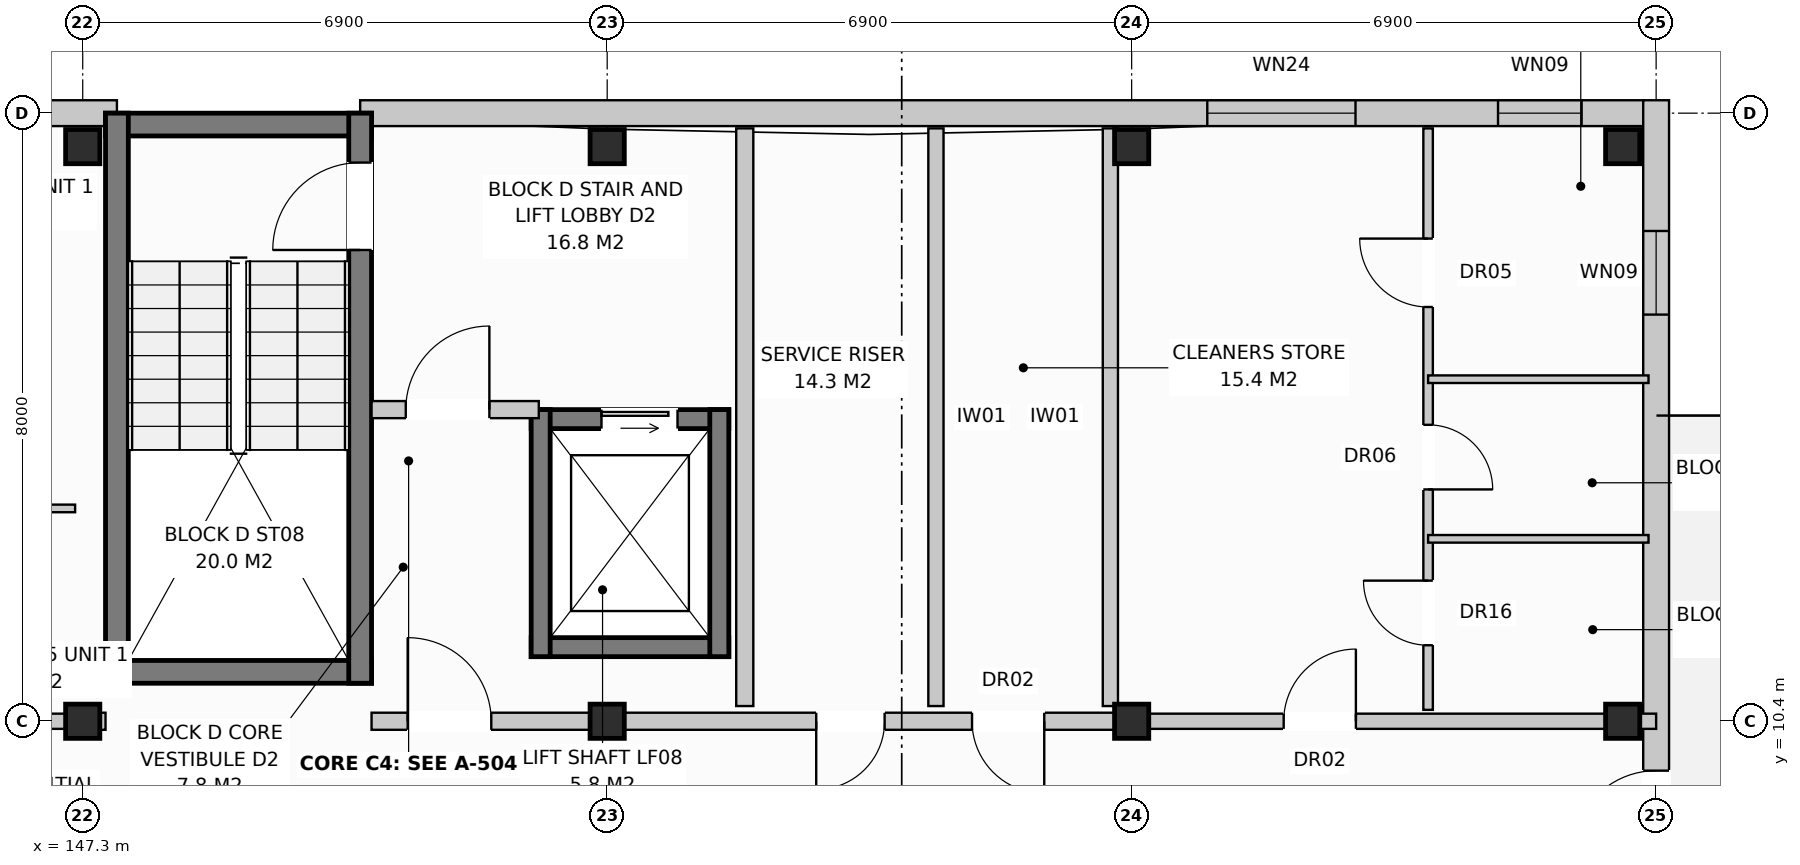
"""IFC4 building model, lengths in metres.
Left out: names, types, materials, properties, quantities, classifications, styles, units other than length and angle.
Written with IfcOpenShell. Run it as: python <this file> out.ifc"""

import sys

from ifc_helpers import new_model, si_unit, direction, frame, frame_2d, origin, origin_with_axes, origin_2d, place, context, subcontext, project, spatial, rectangle, extrude, element, fill, save


model = new_model("IFC4")
c1 = context("Model", 3, precision=1e-05, world=origin(), true_north=direction((0.0, 1.0)))
c2 = subcontext(c1, "Body", "Model", "MODEL_VIEW")
j1 = project(units=[si_unit("LENGTHUNIT", "METRE"), si_unit("PLANEANGLEUNIT", "RADIAN")], contexts=[c1])
p1 = place(None, origin())
s1 = spatial("IfcSite", under=j1, at=p1, CompositionType="ELEMENT")
p2 = place(p1, origin())
s2 = spatial("IfcBuilding", under=s1, at=p2, CompositionType="ELEMENT")
p3 = place(p2, frame((0.0, 0.0, 17.6)))
s3 = spatial("IfcBuildingStorey", under=s2, at=p3, CompositionType="ELEMENT", Elevation=17.6)
for number, where, z_axis, x_axis in (
    (1, (147.3, 10.4, 0.0), (0.0, 0.0, 1.0), (1.0, 0.0, 0.0)),
    (2, (147.3, 17.96, 0.0), (0.0, 0.0, 1.0), (1.0, 0.0, 0.0)),
    (3, (154.2, 10.4, 0.0), (0.0, 0.0, 1.0), (1.0, 0.0, 0.0)),
    (4, (154.2, 17.96, 0.0), (0.0, 0.0, 1.0), (1.0, 0.0, 0.0)),
    (5, (161.1, 10.4, 0.0), (0.0, 0.0, 1.0), (1.0, 0.0, 0.0)),
    (6, (161.1, 17.96, 0.0), (0.0, 0.0, 1.0), (1.0, 0.0, 0.0)),
    (7, (167.56, 10.4, 0.0), (0.0, 0.0, 1.0), (1.0, 0.0, 0.0)),
    (8, (167.56, 17.96, 0.0), (0.0, 0.0, 1.0), (1.0, 0.0, 0.0)),
):
    element("IfcColumn", number, at=place(p3, frame(where, z_axis=z_axis, x_axis=x_axis)), inside=s3, PredefinedType="COLUMN", context=c2, shape_type="SweptSolid", body=[
        extrude(rectangle(XDim=0.45, YDim=0.45, at=origin_2d()), origin(), (0.0, 0.0, 1.0), 3.2),
    ])
p4 = place(p3, frame((130.25, 18.4, 0.0), z_axis=(0.0, 0.0, 1.0), x_axis=(1.0, 0.0, 0.0)))
e9 = element("IfcWall", 9, at=p4, inside=s3, PredefinedType="STANDARD", context=c2, shape_type="SweptSolid", body=[
    extrude(rectangle(XDim=17.5, YDim=0.34, at=frame_2d((8.75, 0.0))), origin(), (0.0, 0.0, 1.0), 2.95),
])
p5 = place(p4, frame((11.92, 0.0, 0.0)))
e10 = element("IfcOpeningElement", 10, at=p5, cuts=e9, PredefinedType="OPENING", context=c2, shape_type="SweptSolid", body=[
    extrude(rectangle(XDim=1.05, YDim=2.12, at=frame_2d((0.525, 1.06))), frame((0.0, 0.182, 0.0), z_axis=(0.0, -1.0, 0.0), x_axis=(1.0, 0.0, 0.0)), (0.0, 0.0, 1.0), 0.364),
])
p6 = place(p4, frame((15.07, 0.0, 0.72)))
e11 = element("IfcOpeningElement", 11, at=p6, cuts=e9, PredefinedType="OPENING", context=c2, shape_type="SweptSolid", body=[
    extrude(rectangle(XDim=1.1, YDim=1.5, at=frame_2d((0.55, 0.75))), frame((0.0, 0.182, 0.0), z_axis=(0.0, -1.0, 0.0), x_axis=(1.0, 0.0, 0.0)), (0.0, 0.0, 1.0), 0.364),
])
p7 = place(p3, frame((150.95, 18.4, 0.0), z_axis=(0.0, 0.0, 1.0), x_axis=(1.0, 0.0, 0.0)))
e12 = element("IfcWall", 12, at=p7, inside=s3, PredefinedType="STANDARD", context=c2, shape_type="SweptSolid", body=[
    extrude(rectangle(XDim=16.89, YDim=0.34, at=frame_2d((8.445, 0.0))), origin(), (0.0, 0.0, 1.0), 2.95),
])
p8 = place(p7, frame((11.145, 0.0, 0.8)))
e13 = element("IfcOpeningElement", 13, at=p8, cuts=e12, PredefinedType="OPENING", context=c2, shape_type="SweptSolid", body=[
    extrude(rectangle(XDim=1.95, YDim=1.65, at=frame_2d((0.975, 0.825))), frame((0.0, 0.182, 0.0), z_axis=(0.0, -1.0, 0.0), x_axis=(1.0, 0.0, 0.0)), (0.0, 0.0, 1.0), 0.364),
])
p9 = place(p7, frame((14.97, 0.0, 0.72)))
e14 = element("IfcOpeningElement", 14, at=p9, cuts=e12, PredefinedType="OPENING", context=c2, shape_type="SweptSolid", body=[
    extrude(rectangle(XDim=1.1, YDim=1.5, at=frame_2d((0.55, 0.75))), frame((0.0, 0.182, 0.0), z_axis=(0.0, -1.0, 0.0), x_axis=(1.0, 0.0, 0.0)), (0.0, 0.0, 1.0), 0.364),
])
p10 = place(p3, frame((168.0, -0.17, 0.0), z_axis=(0.0, 0.0, 1.0), x_axis=(0.0, 1.0, 0.0)))
e15 = element("IfcWall", 15, at=p10, inside=s3, PredefinedType="STANDARD", context=c2, shape_type="SweptSolid", body=[
    extrude(rectangle(XDim=18.74, YDim=0.34, at=frame_2d((9.37, 0.0))), origin(), (0.0, 0.0, 1.0), 2.95),
])
p11 = place(p10, frame((8.82, 0.0, 0.0)))
e16 = element("IfcOpeningElement", 16, at=p11, cuts=e15, PredefinedType="OPENING", context=c2, shape_type="SweptSolid", body=[
    extrude(rectangle(XDim=1.1, YDim=2.1, at=frame_2d((0.55, 1.05))), frame((0.0, 0.182, 0.0), z_axis=(0.0, -1.0, 0.0), x_axis=(1.0, 0.0, 0.0)), (0.0, 0.0, 1.0), 0.364),
])
p12 = place(p10, frame((1.72, 0.0, 0.72)))
e17 = element("IfcOpeningElement", 17, at=p12, cuts=e15, PredefinedType="OPENING", context=c2, shape_type="SweptSolid", body=[
    extrude(rectangle(XDim=1.1, YDim=1.5, at=frame_2d((0.55, 0.75))), frame((0.0, 0.182, 0.0), z_axis=(0.0, -1.0, 0.0), x_axis=(1.0, 0.0, 0.0)), (0.0, 0.0, 1.0), 0.364),
])
p13 = place(p10, frame((15.92, 0.0, 0.72)))
e18 = element("IfcOpeningElement", 18, at=p13, cuts=e15, PredefinedType="OPENING", context=c2, shape_type="SweptSolid", body=[
    extrude(rectangle(XDim=1.1, YDim=1.5, at=frame_2d((0.55, 0.75))), frame((0.0, 0.182, 0.0), z_axis=(0.0, -1.0, 0.0), x_axis=(1.0, 0.0, 0.0)), (0.0, 0.0, 1.0), 0.364),
])
for number, where, z_axis, x_axis in (
    (19, (147.6, 18.25, 0.0), (0.0, 0.0, 1.0), (1.0, 0.0, 0.0)),
    (20, (147.6, 11.05, 0.0), (0.0, 0.0, 1.0), (1.0, 0.0, 0.0)),
):
    element("IfcWall", number, at=place(p3, frame(where, z_axis=z_axis, x_axis=x_axis)), inside=s3, PredefinedType="SHEAR", context=c2, shape_type="SweptSolid", body=[
        extrude(rectangle(XDim=3.5, YDim=0.3, at=frame_2d((1.75, 0.0))), origin(), (0.0, 0.0, 1.0), 2.95),
    ])
p14 = place(p3, frame((147.75, 10.9, 0.0), z_axis=(0.0, 0.0, 1.0), x_axis=(0.0, 1.0, 0.0)))
e21 = element("IfcWall", 21, at=p14, inside=s3, PredefinedType="SHEAR", context=c2, shape_type="SweptSolid", body=[
    extrude(rectangle(XDim=7.5, YDim=0.3, at=frame_2d((3.75, 0.0))), origin(), (0.0, 0.0, 1.0), 2.95),
])
p15 = place(p3, frame((150.95, 10.9, 0.0), z_axis=(0.0, 0.0, 1.0), x_axis=(0.0, 1.0, 0.0)))
e22 = element("IfcWall", 22, at=p15, inside=s3, PredefinedType="SHEAR", context=c2, shape_type="SweptSolid", body=[
    extrude(rectangle(XDim=7.5, YDim=0.3, at=frame_2d((3.75, 0.0))), origin(), (0.0, 0.0, 1.0), 2.95),
])
p16 = place(p15, frame((5.7, 0.0, 0.0)))
e23 = element("IfcOpeningElement", 23, at=p16, cuts=e22, PredefinedType="OPENING", context=c2, shape_type="SweptSolid", body=[
    extrude(rectangle(XDim=1.15, YDim=2.15, at=frame_2d((0.575, 1.075))), frame((0.0, 0.162, 0.0), z_axis=(0.0, -1.0, 0.0), x_axis=(1.0, 0.0, 0.0)), (0.0, 0.0, 1.0), 0.324),
])
p17 = place(p3, frame((153.2, 14.375, 0.0), z_axis=(0.0, 0.0, 1.0), x_axis=(1.0, 0.0, 0.0)))
e24 = element("IfcWall", 24, at=p17, inside=s3, PredefinedType="SHEAR", context=c2, shape_type="SweptSolid", body=[
    extrude(rectangle(XDim=2.6, YDim=0.25, at=frame_2d((1.3, 0.0))), origin(), (0.0, 0.0, 1.0), 2.95),
])
p18 = place(p17, frame((0.925, 0.0, 0.0)))
e25 = element("IfcOpeningElement", 25, at=p18, cuts=e24, PredefinedType="OPENING", context=c2, shape_type="SweptSolid", body=[
    extrude(rectangle(XDim=1.0, YDim=2.1, at=frame_2d((0.5, 1.05))), frame((0.0, 0.137, 0.0), z_axis=(0.0, -1.0, 0.0), x_axis=(1.0, 0.0, 0.0)), (0.0, 0.0, 1.0), 0.274),
])
p19 = place(p3, frame((153.2, 11.375, 0.0), z_axis=(0.0, 0.0, 1.0), x_axis=(1.0, 0.0, 0.0)))
e26 = element("IfcWall", 26, at=p19, inside=s3, PredefinedType="SHEAR", context=c2, shape_type="SweptSolid", body=[
    extrude(rectangle(XDim=2.6, YDim=0.25, at=frame_2d((1.3, 0.0))), origin(), (0.0, 0.0, 1.0), 2.95),
])
for number, where, z_axis, x_axis in (
    (27, (153.325, 11.25, 0.0), (0.0, 0.0, 1.0), (0.0, 1.0, 0.0)),
    (28, (155.675, 11.25, 0.0), (0.0, 0.0, 1.0), (0.0, 1.0, 0.0)),
):
    element("IfcWall", number, at=place(p3, frame(where, z_axis=z_axis, x_axis=x_axis)), inside=s3, PredefinedType="SHEAR", context=c2, shape_type="SweptSolid", body=[
        extrude(rectangle(XDim=3.25, YDim=0.25, at=frame_2d((1.625, 0.0))), origin(), (0.0, 0.0, 1.0), 2.95),
    ])
p20 = place(p3, frame((156.01, 10.6, 0.0), z_axis=(0.0, 0.0, 1.0), x_axis=(0.0, 1.0, 0.0)))
e29 = element("IfcWall", 29, at=p20, inside=s3, PredefinedType="PARTITIONING", context=c2, shape_type="SweptSolid", body=[
    extrude(rectangle(XDim=7.6, YDim=0.225, at=frame_2d((3.8, 0.0))), origin(), (0.0, 0.0, 1.0), 2.95),
])
p21 = place(p3, frame((151.1, 14.5, 0.0), z_axis=(0.0, 0.0, 1.0), x_axis=(1.0, 0.0, 0.0)))
e30 = element("IfcWall", 30, at=p21, inside=s3, PredefinedType="PARTITIONING", context=c2, shape_type="SweptSolid", body=[
    extrude(rectangle(XDim=2.2, YDim=0.225, at=frame_2d((1.1, 0.0))), origin(), (0.0, 0.0, 1.0), 2.95),
])
p22 = place(p21, frame((0.45, 0.0, 0.0)))
e31 = element("IfcOpeningElement", 31, at=p22, cuts=e30, PredefinedType="OPENING", context=c2, shape_type="SweptSolid", body=[
    extrude(rectangle(XDim=1.1, YDim=2.15, at=frame_2d((0.55, 1.075))), frame((0.0, 0.125, 0.0), z_axis=(0.0, -1.0, 0.0), x_axis=(1.0, 0.0, 0.0)), (0.0, 0.0, 1.0), 0.249),
])
p23 = place(p3, frame((147.3, 10.4, 0.0), z_axis=(0.0, 0.0, 1.0), x_axis=(1.0, 0.0, 0.0)))
e32 = element("IfcWall", 32, at=p23, inside=s3, PredefinedType="PARTITIONING", context=c2, shape_type="SweptSolid", body=[
    extrude(rectangle(XDim=0.3, YDim=0.225, at=frame_2d((0.15, 0.0))), origin(), (0.0, 0.0, 1.0), 2.95),
])
p24 = place(p3, frame((158.525, 10.6, 0.0), z_axis=(0.0, 0.0, 1.0), x_axis=(0.0, 1.0, 0.0)))
e33 = element("IfcWall", 33, at=p24, inside=s3, PredefinedType="PARTITIONING", context=c2, shape_type="SweptSolid", body=[
    extrude(rectangle(XDim=7.6, YDim=0.2, at=frame_2d((3.8, 0.0))), origin(), (0.0, 0.0, 1.0), 2.95),
])
p25 = place(p3, frame((160.82, 10.6, 0.0), z_axis=(0.0, 0.0, 1.0), x_axis=(0.0, 1.0, 0.0)))
e34 = element("IfcWall", 34, at=p25, inside=s3, PredefinedType="PARTITIONING", context=c2, shape_type="SweptSolid", body=[
    extrude(rectangle(XDim=7.6, YDim=0.2, at=frame_2d((3.8, 0.0))), origin(), (0.0, 0.0, 1.0), 2.39),
])
p26 = place(p3, frame((151.1, 10.4, 0.0), z_axis=(0.0, 0.0, 1.0), x_axis=(1.0, 0.0, 0.0)))
e35 = element("IfcWall", 35, at=p26, inside=s3, PredefinedType="PARTITIONING", context=c2, shape_type="SweptSolid", body=[
    extrude(rectangle(XDim=10.0, YDim=0.225, at=frame_2d((5.0, 0.0))), origin(), (0.0, 0.0, 1.0), 2.39),
])
p27 = place(p26, frame((0.475, 0.0, 0.0)))
e36 = element("IfcOpeningElement", 36, at=p27, cuts=e35, PredefinedType="OPENING", context=c2, shape_type="SweptSolid", body=[
    extrude(rectangle(XDim=1.1, YDim=2.15, at=frame_2d((0.55, 1.075))), frame((0.0, 0.125, 0.0), z_axis=(0.0, -1.0, 0.0), x_axis=(1.0, 0.0, 0.0)), (0.0, 0.0, 1.0), 0.249),
])
p28 = place(p26, frame((5.85, 0.0, 0.0)))
e37 = element("IfcOpeningElement", 37, at=p28, cuts=e35, PredefinedType="OPENING", context=c2, shape_type="SweptSolid", body=[
    extrude(rectangle(XDim=0.9, YDim=2.1, at=frame_2d((0.45, 1.05))), frame((0.0, 0.125, 0.0), z_axis=(0.0, -1.0, 0.0), x_axis=(1.0, 0.0, 0.0)), (0.0, 0.0, 1.0), 0.249),
])
p29 = place(p26, frame((7.9, 0.0, 0.0)))
e38 = element("IfcOpeningElement", 38, at=p29, cuts=e35, PredefinedType="OPENING", context=c2, shape_type="SweptSolid", body=[
    extrude(rectangle(XDim=0.95, YDim=2.15, at=frame_2d((0.475, 1.075))), frame((0.0, 0.125, 0.0), z_axis=(0.0, -1.0, 0.0), x_axis=(1.0, 0.0, 0.0)), (0.0, 0.0, 1.0), 0.249),
])
p30 = place(p3, frame((140.4, 10.4, 0.0), z_axis=(0.0, 0.0, 1.0), x_axis=(1.0, 0.0, 0.0)))
e39 = element("IfcWall", 39, at=p30, inside=s3, PredefinedType="PARTITIONING", context=c2, shape_type="SweptSolid", body=[
    extrude(rectangle(XDim=6.9, YDim=0.2, at=frame_2d((3.45, 0.0))), origin(), (0.0, 0.0, 1.0), 2.39),
])
p31 = place(p30, frame((2.0, 0.0, 0.0)))
e40 = element("IfcOpeningElement", 40, at=p31, cuts=e39, PredefinedType="OPENING", context=c2, shape_type="SweptSolid", body=[
    extrude(rectangle(XDim=0.95, YDim=2.15, at=frame_2d((0.475, 1.075))), frame((0.0, 0.112, 0.0), z_axis=(0.0, -1.0, 0.0), x_axis=(1.0, 0.0, 0.0)), (0.0, 0.0, 1.0), 0.224),
])
p32 = place(p3, frame((144.7, 13.2, 0.0), z_axis=(0.0, 0.0, 1.0), x_axis=(1.0, 0.0, 0.0)))
e41 = element("IfcWall", 41, at=p32, inside=s3, PredefinedType="PARTITIONING", context=c2, shape_type="SweptSolid", body=[
    extrude(rectangle(XDim=2.5, YDim=0.1, at=frame_2d((1.25, 0.0))), origin(), (0.0, 0.0, 1.0), 2.95),
])
p33 = place(p3, frame((161.1, 10.4, 0.0), z_axis=(0.0, 0.0, 1.0), x_axis=(1.0, 0.0, 0.0)))
e42 = element("IfcWall", 42, at=p33, inside=s3, PredefinedType="PARTITIONING", context=c2, shape_type="SweptSolid", body=[
    extrude(rectangle(XDim=6.9, YDim=0.2, at=frame_2d((3.45, 0.0))), origin(), (0.0, 0.0, 1.0), 2.39),
])
p34 = place(p33, frame((2.0, 0.0, 0.0)))
e43 = element("IfcOpeningElement", 43, at=p34, cuts=e42, PredefinedType="OPENING", context=c2, shape_type="SweptSolid", body=[
    extrude(rectangle(XDim=0.95, YDim=2.15, at=frame_2d((0.475, 1.075))), frame((0.0, 0.112, 0.0), z_axis=(0.0, -1.0, 0.0), x_axis=(1.0, 0.0, 0.0)), (0.0, 0.0, 1.0), 0.224),
])
p35 = place(p3, frame((165.0, 10.55, 0.0), z_axis=(0.0, 0.0, 1.0), x_axis=(0.0, 1.0, 0.0)))
e44 = element("IfcWall", 44, at=p35, inside=s3, PredefinedType="PARTITIONING", context=c2, shape_type="SweptSolid", body=[
    extrude(rectangle(XDim=7.65, YDim=0.125, at=frame_2d((3.825, 0.0))), origin(), (0.0, 0.0, 1.0), 2.95),
])
p36 = place(p35, frame((0.85, 0.0, 0.0)))
e45 = element("IfcOpeningElement", 45, at=p36, cuts=e44, PredefinedType="OPENING", context=c2, shape_type="SweptSolid", body=[
    extrude(rectangle(XDim=0.85, YDim=2.1, at=frame_2d((0.425, 1.05))), frame((0.0, 0.074, 0.0), z_axis=(0.0, -1.0, 0.0), x_axis=(1.0, 0.0, 0.0)), (0.0, 0.0, 1.0), 0.149),
])
p37 = place(p35, frame((2.9, 0.0, 0.0)))
e46 = element("IfcOpeningElement", 46, at=p37, cuts=e44, PredefinedType="OPENING", context=c2, shape_type="SweptSolid", body=[
    extrude(rectangle(XDim=0.85, YDim=2.05, at=frame_2d((0.425, 1.025))), frame((0.0, 0.074, 0.0), z_axis=(0.0, -1.0, 0.0), x_axis=(1.0, 0.0, 0.0)), (0.0, 0.0, 1.0), 0.149),
])
p38 = place(p35, frame((5.3, 0.0, 0.0)))
e47 = element("IfcOpeningElement", 47, at=p38, cuts=e44, PredefinedType="OPENING", context=c2, shape_type="SweptSolid", body=[
    extrude(rectangle(XDim=0.9, YDim=2.1, at=frame_2d((0.45, 1.05))), frame((0.0, 0.074, 0.0), z_axis=(0.0, -1.0, 0.0), x_axis=(1.0, 0.0, 0.0)), (0.0, 0.0, 1.0), 0.149),
])
for number, where, z_axis, x_axis in (
    (48, (165.0, 12.8, 0.0), (0.0, 0.0, 1.0), (1.0, 0.0, 0.0)),
    (49, (165.0, 14.9, 0.0), (0.0, 0.0, 1.0), (1.0, 0.0, 0.0)),
):
    element("IfcWall", number, at=place(p3, frame(where, z_axis=z_axis, x_axis=x_axis)), inside=s3, PredefinedType="PARTITIONING", context=c2, shape_type="SweptSolid", body=[
        extrude(rectangle(XDim=2.9, YDim=0.1, at=frame_2d((1.45, 0.0))), origin(), (0.0, 0.0, 1.0), 2.95),
    ])
p39 = place(p8, origin_with_axes())
e50 = element("IfcWindow", 50, at=p39, inside=s3, PartitioningType="SINGLE_PANEL", PredefinedType="WINDOW", context=c2, shape_type="SweptSolid", body=[
    extrude(rectangle(XDim=1.95, YDim=1.65, at=frame_2d((0.975, 0.825))), frame((0.0, 0.03, 0.0), z_axis=(0.0, -1.0, 0.0), x_axis=(1.0, 0.0, 0.0)), (0.0, 0.0, 1.0), 0.06),
])
fill(e13, e50)
p40 = place(p9, origin_with_axes())
e51 = element("IfcWindow", 51, at=p40, inside=s3, PartitioningType="SINGLE_PANEL", PredefinedType="WINDOW", context=c2, shape_type="SweptSolid", body=[
    extrude(rectangle(XDim=1.1, YDim=1.5, at=frame_2d((0.55, 0.75))), frame((0.0, 0.03, 0.0), z_axis=(0.0, -1.0, 0.0), x_axis=(1.0, 0.0, 0.0)), (0.0, 0.0, 1.0), 0.06),
])
fill(e14, e51)
p41 = place(p11, origin_with_axes())
e52 = element("IfcDoor", 52, at=p41, inside=s3, OperationType="SINGLE_SWING_LEFT", PredefinedType="DOOR", context=c2, shape_type="SweptSolid", body=[
    extrude(rectangle(XDim=1.1, YDim=2.1, at=frame_2d((0.55, 1.05))), frame((0.0, 0.025, 0.0), z_axis=(0.0, -1.0, 0.0), x_axis=(1.0, 0.0, 0.0)), (0.0, 0.0, 1.0), 0.05),
])
fill(e16, e52)
p42 = place(p13, origin_with_axes())
e53 = element("IfcWindow", 53, at=p42, inside=s3, PartitioningType="SINGLE_PANEL", PredefinedType="WINDOW", context=c2, shape_type="SweptSolid", body=[
    extrude(rectangle(XDim=1.1, YDim=1.5, at=frame_2d((0.55, 0.75))), frame((0.0, 0.03, 0.0), z_axis=(0.0, -1.0, 0.0), x_axis=(1.0, 0.0, 0.0)), (0.0, 0.0, 1.0), 0.06),
])
fill(e18, e53)
p43 = place(p16, origin_with_axes())
e54 = element("IfcDoor", 54, at=p43, inside=s3, OperationType="SINGLE_SWING_LEFT", PredefinedType="DOOR", context=c2, shape_type="SweptSolid", body=[
    extrude(rectangle(XDim=1.15, YDim=2.15, at=frame_2d((0.575, 1.075))), frame((0.0, 0.025, 0.0), z_axis=(0.0, -1.0, 0.0), x_axis=(1.0, 0.0, 0.0)), (0.0, 0.0, 1.0), 0.05),
])
fill(e23, e54)
p44 = place(p18, origin_with_axes())
e55 = element("IfcDoor", 55, at=p44, inside=s3, OperationType="SLIDING_TO_LEFT", PredefinedType="DOOR", context=c2, shape_type="SweptSolid", body=[
    extrude(rectangle(XDim=1.0, YDim=2.1, at=frame_2d((0.5, 1.05))), frame((0.0, 0.025, 0.0), z_axis=(0.0, -1.0, 0.0), x_axis=(1.0, 0.0, 0.0)), (0.0, 0.0, 1.0), 0.05),
])
fill(e25, e55)
p45 = place(p22, origin_with_axes())
e56 = element("IfcDoor", 56, at=p45, inside=s3, OperationType="SINGLE_SWING_RIGHT", PredefinedType="DOOR", context=c2, shape_type="SweptSolid", body=[
    extrude(rectangle(XDim=1.1, YDim=2.15, at=frame_2d((0.55, 1.075))), frame((0.0, 0.025, 0.0), z_axis=(0.0, -1.0, 0.0), x_axis=(1.0, 0.0, 0.0)), (0.0, 0.0, 1.0), 0.05),
])
fill(e31, e56)
p46 = place(p27, origin_with_axes())
e57 = element("IfcDoor", 57, at=p46, inside=s3, OperationType="SINGLE_SWING_LEFT", PredefinedType="DOOR", context=c2, shape_type="SweptSolid", body=[
    extrude(rectangle(XDim=1.1, YDim=2.15, at=frame_2d((0.55, 1.075))), frame((0.0, 0.025, 0.0), z_axis=(0.0, -1.0, 0.0), x_axis=(1.0, 0.0, 0.0)), (0.0, 0.0, 1.0), 0.05),
])
fill(e36, e57)
p47 = place(p28, frame((0.9, 0.0, 0.0), z_axis=(0.0, 0.0, 1.0), x_axis=(-1.0, 0.0, 0.0)))
e58 = element("IfcDoor", 58, at=p47, inside=s3, OperationType="SINGLE_SWING_LEFT", PredefinedType="DOOR", context=c2, shape_type="SweptSolid", body=[
    extrude(rectangle(XDim=0.9, YDim=2.1, at=frame_2d((0.45, 1.05))), frame((0.0, 0.025, 0.0), z_axis=(0.0, -1.0, 0.0), x_axis=(1.0, 0.0, 0.0)), (0.0, 0.0, 1.0), 0.05),
])
fill(e37, e58)
p48 = place(p29, frame((0.95, 0.0, 0.0), z_axis=(0.0, 0.0, 1.0), x_axis=(-1.0, 0.0, 0.0)))
e59 = element("IfcDoor", 59, at=p48, inside=s3, OperationType="SINGLE_SWING_RIGHT", PredefinedType="DOOR", context=c2, shape_type="SweptSolid", body=[
    extrude(rectangle(XDim=0.95, YDim=2.15, at=frame_2d((0.475, 1.075))), frame((0.0, 0.025, 0.0), z_axis=(0.0, -1.0, 0.0), x_axis=(1.0, 0.0, 0.0)), (0.0, 0.0, 1.0), 0.05),
])
fill(e38, e59)
p49 = place(p34, origin_with_axes())
e60 = element("IfcDoor", 60, at=p49, inside=s3, OperationType="SINGLE_SWING_RIGHT", PredefinedType="DOOR", context=c2, shape_type="SweptSolid", body=[
    extrude(rectangle(XDim=0.95, YDim=2.15, at=frame_2d((0.475, 1.075))), frame((0.0, 0.025, 0.0), z_axis=(0.0, -1.0, 0.0), x_axis=(1.0, 0.0, 0.0)), (0.0, 0.0, 1.0), 0.05),
])
fill(e43, e60)
p50 = place(p36, origin_with_axes())
e61 = element("IfcDoor", 61, at=p50, inside=s3, OperationType="SINGLE_SWING_RIGHT", PredefinedType="DOOR", context=c2, shape_type="SweptSolid", body=[
    extrude(rectangle(XDim=0.85, YDim=2.1, at=frame_2d((0.425, 1.05))), frame((0.0, 0.025, 0.0), z_axis=(0.0, -1.0, 0.0), x_axis=(1.0, 0.0, 0.0)), (0.0, 0.0, 1.0), 0.05),
])
fill(e45, e61)
p51 = place(p37, frame((0.85, 0.0, 0.0), z_axis=(0.0, 0.0, 1.0), x_axis=(-1.0, 0.0, 0.0)))
e62 = element("IfcDoor", 62, at=p51, inside=s3, OperationType="SINGLE_SWING_LEFT", PredefinedType="DOOR", context=c2, shape_type="SweptSolid", body=[
    extrude(rectangle(XDim=0.85, YDim=2.05, at=frame_2d((0.425, 1.025))), frame((0.0, 0.025, 0.0), z_axis=(0.0, -1.0, 0.0), x_axis=(1.0, 0.0, 0.0)), (0.0, 0.0, 1.0), 0.05),
])
fill(e46, e62)
p52 = place(p38, origin_with_axes())
e63 = element("IfcDoor", 63, at=p52, inside=s3, OperationType="SINGLE_SWING_RIGHT", PredefinedType="DOOR", context=c2, shape_type="SweptSolid", body=[
    extrude(rectangle(XDim=0.9, YDim=2.1, at=frame_2d((0.45, 1.05))), frame((0.0, 0.025, 0.0), z_axis=(0.0, -1.0, 0.0), x_axis=(1.0, 0.0, 0.0)), (0.0, 0.0, 1.0), 0.05),
])
fill(e47, e63)
save(model, sys.argv[1])
